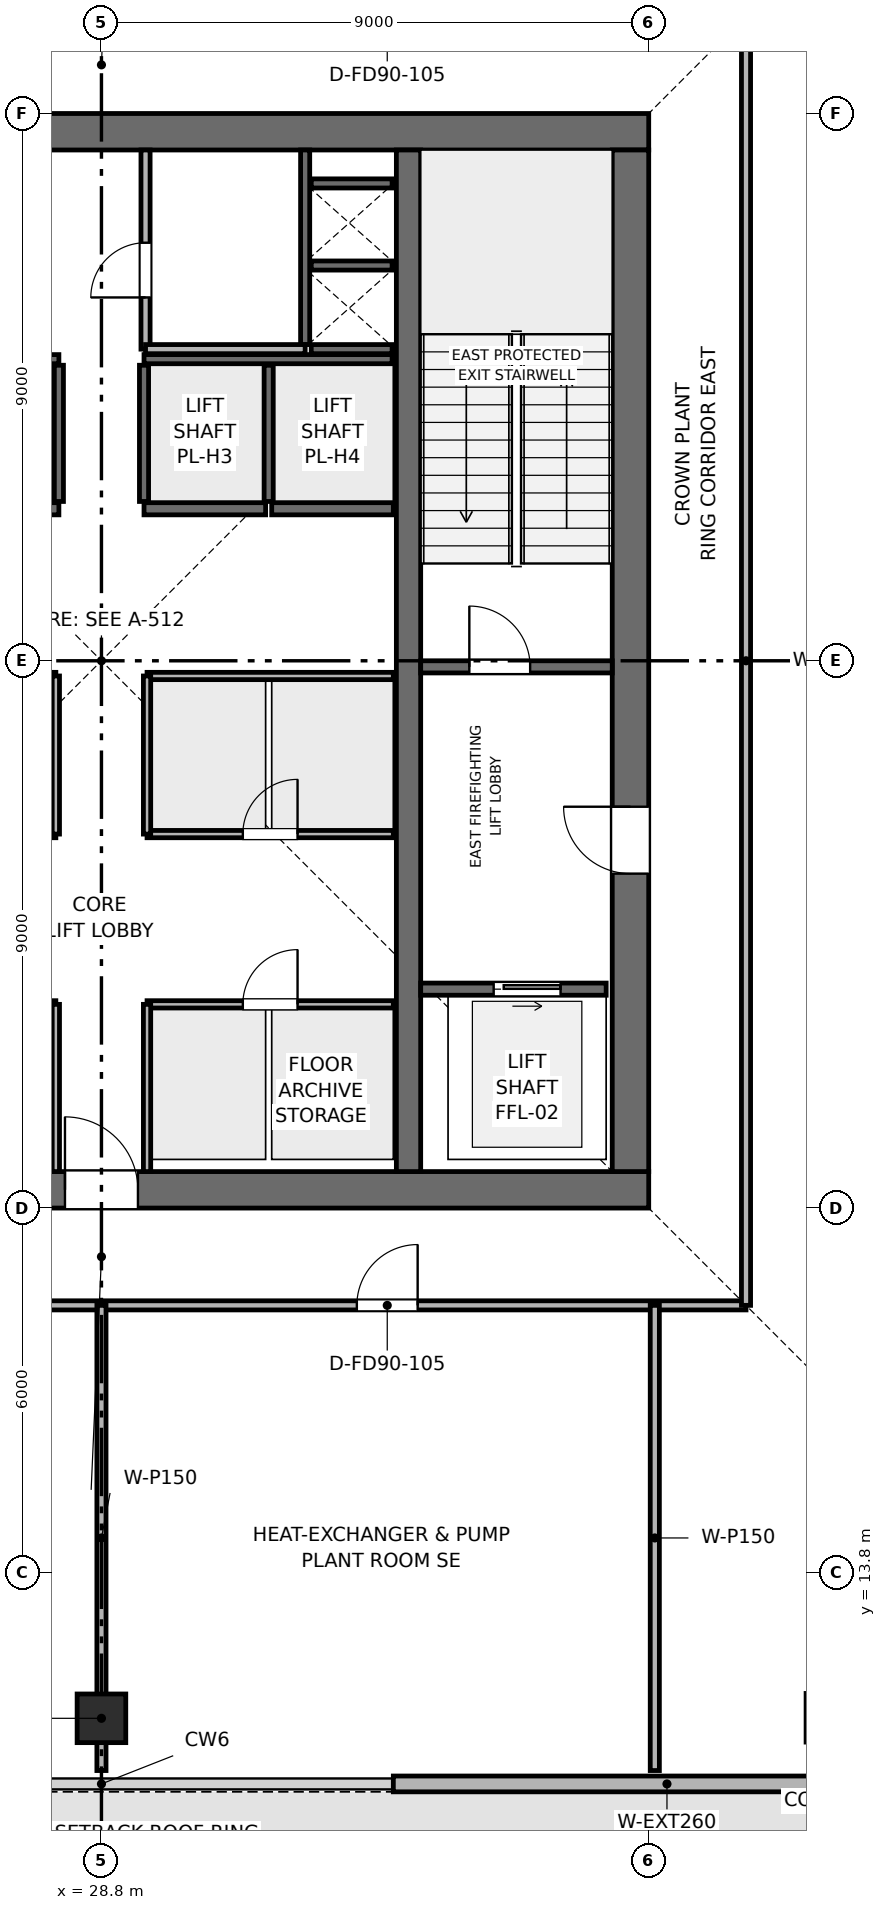
"""IFC4 building model, lengths in metres.
Left out: names, types, materials, properties, quantities, classifications, styles, units other than length and angle.
Written with IfcOpenShell. Run it as: python <this file> out.ifc"""

import sys

from ifc_helpers import new_model, si_unit, direction, frame, frame_2d, origin, origin_2d, place, context, subcontext, project, spatial, rectangle, extrude, element, fill, save


model = new_model("IFC4")
c1 = context("Model", 3, precision=1e-05, world=origin(), true_north=direction((0.0, 1.0)))
c2 = subcontext(c1, "Body", "Model", "MODEL_VIEW")
j1 = project(units=[si_unit("LENGTHUNIT", "METRE"), si_unit("PLANEANGLEUNIT", "RADIAN")], contexts=[c1])
p1 = place(None, origin())
s1 = spatial("IfcSite", under=j1, at=p1, CompositionType="ELEMENT")
p2 = place(p1, origin())
s2 = spatial("IfcBuilding", under=s1, at=p2, CompositionType="ELEMENT")
p3 = place(p2, frame((0.0, 0.0, 369.0)))
s3 = spatial("IfcBuildingStorey", under=s2, at=p3, CompositionType="ELEMENT", Elevation=369.0)
p4 = place(p3, frame((19.8, 20.1, 0.0), z_axis=(0.0, 0.0, 1.0), x_axis=(1.0, 0.0, 0.0)))
e1 = element("IfcWall", 1, at=p4, inside=s3, PredefinedType="SHEAR", context=c2, shape_type="SweptSolid", body=[
    extrude(rectangle(XDim=18.0, YDim=0.6, at=frame_2d((9.0, 0.0))), origin(), (0.0, 0.0, 1.0), 4.8),
])
p5 = place(p4, frame((8.4, 0.0, 0.0)))
e2 = element("IfcOpeningElement", 2, at=p5, cuts=e1, PredefinedType="OPENING", context=c2, shape_type="SweptSolid", body=[
    extrude(rectangle(XDim=1.2, YDim=2.2, at=frame_2d((0.6, 1.1))), frame((0.0, 0.31, 0.0), z_axis=(0.0, -1.0, 0.0), x_axis=(1.0, 0.0, 0.0)), (0.0, 0.0, 1.0), 0.62),
])
p6 = place(p3, frame((19.8, 37.5, 0.0), z_axis=(0.0, 0.0, 1.0), x_axis=(1.0, 0.0, 0.0)))
e3 = element("IfcWall", 3, at=p6, inside=s3, PredefinedType="SHEAR", context=c2, shape_type="SweptSolid", body=[
    extrude(rectangle(XDim=18.0, YDim=0.6, at=frame_2d((9.0, 0.0))), origin(), (0.0, 0.0, 1.0), 4.8),
])
p7 = place(p6, frame((7.05, 0.0, 0.0)))
e4 = element("IfcOpeningElement", 4, at=p7, cuts=e3, PredefinedType="OPENING", context=c2, shape_type="SweptSolid", body=[
    extrude(rectangle(XDim=1.1, YDim=2.15, at=frame_2d((0.55, 1.075))), frame((0.0, 0.31, 0.0), z_axis=(0.0, -1.0, 0.0), x_axis=(1.0, 0.0, 0.0)), (0.0, 0.0, 1.0), 0.62),
])
p8 = place(p3, frame((37.5, 20.4, 0.0), z_axis=(0.0, 0.0, 1.0), x_axis=(0.0, 1.0, 0.0)))
e5 = element("IfcWall", 5, at=p8, inside=s3, PredefinedType="SHEAR", context=c2, shape_type="SweptSolid", body=[
    extrude(rectangle(XDim=16.8, YDim=0.6, at=frame_2d((8.4, 0.0))), origin(), (0.0, 0.0, 1.0), 4.8),
])
p9 = place(p8, frame((4.9, 0.0, 0.0)))
e6 = element("IfcOpeningElement", 6, at=p9, cuts=e5, PredefinedType="OPENING", context=c2, shape_type="SweptSolid", body=[
    extrude(rectangle(XDim=1.1, YDim=2.15, at=frame_2d((0.55, 1.075))), frame((0.0, 0.31, 0.0), z_axis=(0.0, -1.0, 0.0), x_axis=(1.0, 0.0, 0.0)), (0.0, 0.0, 1.0), 0.62),
])
p10 = place(p3, frame((33.85, 20.4, 0.0), z_axis=(0.0, 0.0, 1.0), x_axis=(0.0, 1.0, 0.0)))
e7 = element("IfcWall", 7, at=p10, inside=s3, PredefinedType="SHEAR", context=c2, shape_type="SweptSolid", body=[
    extrude(rectangle(XDim=16.8, YDim=0.4, at=frame_2d((8.4, 0.0))), origin(), (0.0, 0.0, 1.0), 4.8),
])
p11 = place(p3, frame((28.8, 11.409, 0.025), z_axis=(0.0, 0.35111223817, 0.936333378774), x_axis=(-1.0, 0.0, 0.0)))
e8 = element("IfcColumn", 8, at=p11, inside=s3, PredefinedType="COLUMN", context=c2, shape_type="SweptSolid", body=[
    extrude(rectangle(XDim=0.8, YDim=0.8, at=origin_2d()), origin(), (0.0, 0.0, 1.0), 4.776),
])
p12 = place(p3, frame((40.788, 11.418, 0.049), z_axis=(-0.22799617066, 0.341969140747, 0.911633069245), x_axis=(-0.832031491738, -0.554728399089, 0.0)))
e9 = element("IfcColumn", 9, at=p12, inside=s3, PredefinedType="COLUMN", context=c2, shape_type="SweptSolid", body=[
    extrude(rectangle(XDim=0.8, YDim=0.8, at=origin_2d()), origin(), (0.0, 0.0, 1.0), 4.86),
])
p13 = place(p3, frame((41.246, 16.354, 0.018), z_axis=(-0.235770777249, 0.235770777249, 0.942774777553), x_axis=(-0.707106781187, -0.707106781187, 0.0)))
e10 = element("IfcColumn", 10, at=p13, inside=s3, PredefinedType="COLUMN", context=c2, shape_type="SweptSolid", body=[
    extrude(rectangle(XDim=0.8, YDim=0.8, at=origin_2d()), origin(), (0.0, 0.0, 1.0), 4.751),
])
p14 = place(p3, frame((42.6, 10.33, 0.0), z_axis=(0.0, 0.0, 1.0), x_axis=(-1.0, 0.0, 0.0)))
e11 = element("IfcWall", 11, at=p14, inside=s3, PredefinedType="SOLIDWALL", context=c2, shape_type="SweptSolid", body=[
    extrude(rectangle(XDim=9.0, YDim=0.26, at=frame_2d((4.5, 0.0))), origin(), (0.0, 0.0, 1.0), 4.5),
])
p15 = place(p3, frame((34.05, 28.7, 0.0), z_axis=(0.0, 0.0, 1.0), x_axis=(1.0, 0.0, 0.0)))
e12 = element("IfcWall", 12, at=p15, inside=s3, PredefinedType="SHEAR", context=c2, shape_type="SweptSolid", body=[
    extrude(rectangle(XDim=3.15, YDim=0.2, at=frame_2d((1.575, 0.0))), origin(), (0.0, 0.0, 1.0), 4.5),
])
p16 = place(p15, frame((0.8, 0.0, 0.0)))
e13 = element("IfcOpeningElement", 13, at=p16, cuts=e12, PredefinedType="OPENING", context=c2, shape_type="SweptSolid", body=[
    extrude(rectangle(XDim=1.0, YDim=2.1, at=frame_2d((0.5, 1.05))), frame((0.0, 0.11, 0.0), z_axis=(0.0, -1.0, 0.0), x_axis=(1.0, 0.0, 0.0)), (0.0, 0.0, 1.0), 0.22),
])
p17 = place(p3, frame((32.15, 34.0, 0.0), z_axis=(0.0, 0.0, 1.0), x_axis=(0.0, 1.0, 0.0)))
e14 = element("IfcWall", 14, at=p17, inside=s3, PredefinedType="SHEAR", context=c2, shape_type="SweptSolid", body=[
    extrude(rectangle(XDim=3.2, YDim=0.15, at=frame_2d((1.6, 0.0))), origin(), (0.0, 0.0, 1.0), 4.5),
])
for number, where, z_axis, x_axis in (
    (15, (32.25, 33.925, 0.0), (0.0, 0.0, 1.0), (1.0, 0.0, 0.0)),
    (16, (32.25, 35.3, 0.0), (0.0, 0.0, 1.0), (1.0, 0.0, 0.0)),
):
    element("IfcWall", number, at=place(p3, frame(where, z_axis=z_axis, x_axis=x_axis)), inside=s3, PredefinedType="SHEAR", context=c2, shape_type="SweptSolid", body=[
        extrude(rectangle(XDim=1.33, YDim=0.15, at=frame_2d((0.665, 0.0))), origin(), (0.0, 0.0, 1.0), 4.5),
    ])
p18 = place(p3, frame((34.05, 23.4, 0.0), z_axis=(0.0, 0.0, 1.0), x_axis=(1.0, 0.0, 0.0)))
e17 = element("IfcWall", 17, at=p18, inside=s3, PredefinedType="SHEAR", context=c2, shape_type="SweptSolid", body=[
    extrude(rectangle(XDim=3.05, YDim=0.2, at=frame_2d((1.525, 0.0))), origin(), (0.0, 0.0, 1.0), 4.5),
])
p19 = place(p18, frame((1.2, 0.0, 0.0)))
e18 = element("IfcOpeningElement", 18, at=p19, cuts=e17, PredefinedType="OPENING", context=c2, shape_type="SweptSolid", body=[
    extrude(rectangle(XDim=1.1, YDim=2.15, at=frame_2d((0.55, 1.075))), frame((0.0, 0.11, 0.0), z_axis=(0.0, -1.0, 0.0), x_axis=(1.0, 0.0, 0.0)), (0.0, 0.0, 1.0), 0.22),
])
for number, where, z_axis, x_axis in (
    (19, (26.1, 31.3, 0.0), (0.0, 0.0, 1.0), (1.0, 0.0, 0.0)),
    (20, (29.5, 31.3, 0.0), (0.0, 0.0, 1.0), (1.0, 0.0, 0.0)),
    (21, (31.6, 31.3, 0.0), (0.0, 0.0, 1.0), (1.0, 0.0, 0.0)),
):
    element("IfcWall", number, at=place(p3, frame(where, z_axis=z_axis, x_axis=x_axis)), inside=s3, PredefinedType="SHEAR", context=c2, shape_type="SweptSolid", body=[
        extrude(rectangle(XDim=2.0, YDim=0.2, at=frame_2d((1.0, 0.0))), origin(), (0.0, 0.0, 1.0), 4.5),
    ])
p20 = place(p3, frame((32.25, 36.65, 0.0), z_axis=(0.0, 0.0, 1.0), x_axis=(1.0, 0.0, 0.0)))
e22 = element("IfcWall", 22, at=p20, inside=s3, PredefinedType="SHEAR", context=c2, shape_type="SweptSolid", body=[
    extrude(rectangle(XDim=1.33, YDim=0.15, at=frame_2d((0.665, 0.0))), origin(), (0.0, 0.0, 1.0), 4.5),
])
for number, where, z_axis, x_axis in (
    (23, (24.02, 33.76, 0.0), (0.0, 0.0, 1.0), (1.0, 0.0, 0.0)),
    (24, (29.5, 33.76, 0.0), (0.0, 0.0, 1.0), (1.0, 0.0, 0.0)),
):
    element("IfcWall", number, at=place(p3, frame(where, z_axis=z_axis, x_axis=x_axis)), inside=s3, PredefinedType="SHEAR", context=c2, shape_type="SweptSolid", body=[
        extrude(rectangle(XDim=4.08, YDim=0.15, at=frame_2d((2.04, 0.0))), origin(), (0.0, 0.0, 1.0), 4.5),
    ])
for number, where, z_axis, x_axis in (
    (25, (28.1, 31.42, 0.0), (0.0, 0.0, 1.0), (0.0, 1.0, 0.0)),
    (26, (29.5, 31.42, 0.0), (0.0, 0.0, 1.0), (0.0, 1.0, 0.0)),
    (27, (31.55, 31.42, 0.0), (0.0, 0.0, 1.0), (0.0, 1.0, 0.0)),
):
    element("IfcWall", number, at=place(p3, frame(where, z_axis=z_axis, x_axis=x_axis)), inside=s3, PredefinedType="SHEAR", context=c2, shape_type="SweptSolid", body=[
        extrude(rectangle(XDim=2.24, YDim=0.15, at=frame_2d((1.12, 0.0))), origin(), (0.0, 0.0, 1.0), 4.5),
    ])
p21 = place(p3, frame((29.525, 33.925, 0.0), z_axis=(0.0, 0.0, 1.0), x_axis=(0.0, 1.0, 0.0)))
e28 = element("IfcWall", 28, at=p21, inside=s3, PredefinedType="PARTITIONING", context=c2, shape_type="SweptSolid", body=[
    extrude(rectangle(XDim=3.275, YDim=0.15, at=frame_2d((1.637, 0.0))), origin(), (0.0, 0.0, 1.0), 4.5),
])
p22 = place(p21, frame((0.85, 0.0, 0.0)))
e29 = element("IfcOpeningElement", 29, at=p22, cuts=e28, PredefinedType="OPENING", context=c2, shape_type="SweptSolid", body=[
    extrude(rectangle(XDim=0.9, YDim=2.1, at=frame_2d((0.45, 1.05))), frame((0.0, 0.085, 0.0), z_axis=(0.0, -1.0, 0.0), x_axis=(1.0, 0.0, 0.0)), (0.0, 0.0, 1.0), 0.17),
])
p23 = place(p3, frame((29.525, 33.925, 0.0), z_axis=(0.0, 0.0, 1.0), x_axis=(1.0, 0.0, 0.0)))
e30 = element("IfcWall", 30, at=p23, inside=s3, PredefinedType="PARTITIONING", context=c2, shape_type="SweptSolid", body=[
    extrude(rectangle(XDim=2.625, YDim=0.15, at=frame_2d((1.312, 0.0))), origin(), (0.0, 0.0, 1.0), 4.5),
])
p24 = place(p3, frame((24.0, 23.15, 0.0), z_axis=(0.0, 0.0, 1.0), x_axis=(1.0, 0.0, 0.0)))
e31 = element("IfcWall", 31, at=p24, inside=s3, PredefinedType="PARTITIONING", context=c2, shape_type="SweptSolid", body=[
    extrude(rectangle(XDim=4.05, YDim=0.12, at=frame_2d((2.025, 0.0))), origin(), (0.0, 0.0, 1.0), 4.5),
])
p25 = place(p24, frame((1.575, 0.0, 0.0)))
e32 = element("IfcOpeningElement", 32, at=p25, cuts=e31, PredefinedType="OPENING", context=c2, shape_type="SweptSolid", body=[
    extrude(rectangle(XDim=0.9, YDim=2.1, at=frame_2d((0.45, 1.05))), frame((0.0, 0.07, 0.0), z_axis=(0.0, -1.0, 0.0), x_axis=(1.0, 0.0, 0.0)), (0.0, 0.0, 1.0), 0.14),
])
p26 = place(p3, frame((28.05, 20.4, 0.0), z_axis=(0.0, 0.0, 1.0), x_axis=(0.0, 1.0, 0.0)))
e33 = element("IfcWall", 33, at=p26, inside=s3, PredefinedType="PARTITIONING", context=c2, shape_type="SweptSolid", body=[
    extrude(rectangle(XDim=2.75, YDim=0.12, at=frame_2d((1.375, 0.0))), origin(), (0.0, 0.0, 1.0), 4.5),
])
p27 = place(p3, frame((29.55, 23.15, 0.0), z_axis=(0.0, 0.0, 1.0), x_axis=(1.0, 0.0, 0.0)))
e34 = element("IfcWall", 34, at=p27, inside=s3, PredefinedType="PARTITIONING", context=c2, shape_type="SweptSolid", body=[
    extrude(rectangle(XDim=4.05, YDim=0.12, at=frame_2d((2.025, 0.0))), origin(), (0.0, 0.0, 1.0), 4.5),
])
p28 = place(p27, frame((1.575, 0.0, 0.0)))
e35 = element("IfcOpeningElement", 35, at=p28, cuts=e34, PredefinedType="OPENING", context=c2, shape_type="SweptSolid", body=[
    extrude(rectangle(XDim=0.9, YDim=2.1, at=frame_2d((0.45, 1.05))), frame((0.0, 0.07, 0.0), z_axis=(0.0, -1.0, 0.0), x_axis=(1.0, 0.0, 0.0)), (0.0, 0.0, 1.0), 0.14),
])
p29 = place(p3, frame((29.55, 20.4, 0.0), z_axis=(0.0, 0.0, 1.0), x_axis=(0.0, 1.0, 0.0)))
e36 = element("IfcWall", 36, at=p29, inside=s3, PredefinedType="PARTITIONING", context=c2, shape_type="SweptSolid", body=[
    extrude(rectangle(XDim=2.75, YDim=0.12, at=frame_2d((1.375, 0.0))), origin(), (0.0, 0.0, 1.0), 4.5),
])
p30 = place(p3, frame((24.0, 25.95, 0.0), z_axis=(0.0, 0.0, 1.0), x_axis=(1.0, 0.0, 0.0)))
e37 = element("IfcWall", 37, at=p30, inside=s3, PredefinedType="PARTITIONING", context=c2, shape_type="SweptSolid", body=[
    extrude(rectangle(XDim=4.05, YDim=0.12, at=frame_2d((2.025, 0.0))), origin(), (0.0, 0.0, 1.0), 4.5),
])
p31 = place(p30, frame((1.575, 0.0, 0.0)))
e38 = element("IfcOpeningElement", 38, at=p31, cuts=e37, PredefinedType="OPENING", context=c2, shape_type="SweptSolid", body=[
    extrude(rectangle(XDim=0.9, YDim=2.1, at=frame_2d((0.45, 1.05))), frame((0.0, 0.07, 0.0), z_axis=(0.0, -1.0, 0.0), x_axis=(1.0, 0.0, 0.0)), (0.0, 0.0, 1.0), 0.14),
])
p32 = place(p3, frame((24.0, 28.55, 0.0), z_axis=(0.0, 0.0, 1.0), x_axis=(1.0, 0.0, 0.0)))
e39 = element("IfcWall", 39, at=p32, inside=s3, PredefinedType="PARTITIONING", context=c2, shape_type="SweptSolid", body=[
    extrude(rectangle(XDim=4.05, YDim=0.12, at=frame_2d((2.025, 0.0))), origin(), (0.0, 0.0, 1.0), 4.5),
])
p33 = place(p3, frame((28.05, 25.95, 0.0), z_axis=(0.0, 0.0, 1.0), x_axis=(0.0, 1.0, 0.0)))
e40 = element("IfcWall", 40, at=p33, inside=s3, PredefinedType="PARTITIONING", context=c2, shape_type="SweptSolid", body=[
    extrude(rectangle(XDim=2.6, YDim=0.12, at=frame_2d((1.3, 0.0))), origin(), (0.0, 0.0, 1.0), 4.5),
])
p34 = place(p3, frame((29.55, 25.95, 0.0), z_axis=(0.0, 0.0, 1.0), x_axis=(1.0, 0.0, 0.0)))
e41 = element("IfcWall", 41, at=p34, inside=s3, PredefinedType="PARTITIONING", context=c2, shape_type="SweptSolid", body=[
    extrude(rectangle(XDim=4.05, YDim=0.12, at=frame_2d((2.025, 0.0))), origin(), (0.0, 0.0, 1.0), 4.5),
])
p35 = place(p34, frame((1.575, 0.0, 0.0)))
e42 = element("IfcOpeningElement", 42, at=p35, cuts=e41, PredefinedType="OPENING", context=c2, shape_type="SweptSolid", body=[
    extrude(rectangle(XDim=0.9, YDim=2.1, at=frame_2d((0.45, 1.05))), frame((0.0, 0.07, 0.0), z_axis=(0.0, -1.0, 0.0), x_axis=(1.0, 0.0, 0.0)), (0.0, 0.0, 1.0), 0.14),
])
p36 = place(p3, frame((29.55, 28.55, 0.0), z_axis=(0.0, 0.0, 1.0), x_axis=(1.0, 0.0, 0.0)))
e43 = element("IfcWall", 43, at=p36, inside=s3, PredefinedType="PARTITIONING", context=c2, shape_type="SweptSolid", body=[
    extrude(rectangle(XDim=4.05, YDim=0.12, at=frame_2d((2.025, 0.0))), origin(), (0.0, 0.0, 1.0), 4.5),
])
p37 = place(p3, frame((29.55, 25.95, 0.0), z_axis=(0.0, 0.0, 1.0), x_axis=(0.0, 1.0, 0.0)))
e44 = element("IfcWall", 44, at=p37, inside=s3, PredefinedType="PARTITIONING", context=c2, shape_type="SweptSolid", body=[
    extrude(rectangle(XDim=2.6, YDim=0.12, at=frame_2d((1.3, 0.0))), origin(), (0.0, 0.0, 1.0), 4.5),
])
p38 = place(p3, frame((18.2, 18.2, 0.0), z_axis=(0.0, 0.0, 1.0), x_axis=(1.0, 0.0, 0.0)))
e45 = element("IfcWall", 45, at=p38, inside=s3, PredefinedType="PARTITIONING", context=c2, shape_type="SweptSolid", body=[
    extrude(rectangle(XDim=21.2, YDim=0.15, at=frame_2d((10.6, 0.0))), origin(), (0.0, 0.0, 1.0), 4.085),
])
p39 = place(p38, frame((4.8, 0.0, 0.0)))
e46 = element("IfcOpeningElement", 46, at=p39, cuts=e45, PredefinedType="OPENING", context=c2, shape_type="SweptSolid", body=[
    extrude(rectangle(XDim=1.0, YDim=2.15, at=frame_2d((0.5, 1.075))), frame((0.0, 0.085, 0.0), z_axis=(0.0, -1.0, 0.0), x_axis=(1.0, 0.0, 0.0)), (0.0, 0.0, 1.0), 0.17),
])
p40 = place(p38, frame((14.8, 0.0, 0.0)))
e47 = element("IfcOpeningElement", 47, at=p40, cuts=e45, PredefinedType="OPENING", context=c2, shape_type="SweptSolid", body=[
    extrude(rectangle(XDim=1.0, YDim=2.15, at=frame_2d((0.5, 1.075))), frame((0.0, 0.085, 0.0), z_axis=(0.0, -1.0, 0.0), x_axis=(1.0, 0.0, 0.0)), (0.0, 0.0, 1.0), 0.17),
])
p41 = place(p3, frame((39.4, 18.2, 0.0), z_axis=(0.0, 0.0, 1.0), x_axis=(0.0, 1.0, 0.0)))
e48 = element("IfcWall", 48, at=p41, inside=s3, PredefinedType="PARTITIONING", context=c2, shape_type="SweptSolid", body=[
    extrude(rectangle(XDim=21.2, YDim=0.15, at=frame_2d((10.6, 0.0))), origin(), (0.0, 0.0, 1.0), 4.085),
])
p42 = place(p3, frame((28.8, 10.55, 0.0), z_axis=(0.0, 0.0, 1.0), x_axis=(0.0, 1.0, 0.0)))
e49 = element("IfcWall", 49, at=p42, inside=s3, PredefinedType="PARTITIONING", context=c2, shape_type="SweptSolid", body=[
    extrude(rectangle(XDim=7.65, YDim=0.15, at=frame_2d((3.825, 0.0))), origin(), (0.0, 0.0, 1.0), 4.085),
])
p43 = place(p3, frame((37.9, 10.55, 0.0), z_axis=(0.0, 0.0, 1.0), x_axis=(0.0, 1.0, 0.0)))
e50 = element("IfcWall", 50, at=p43, inside=s3, PredefinedType="PARTITIONING", context=c2, shape_type="SweptSolid", body=[
    extrude(rectangle(XDim=7.65, YDim=0.15, at=frame_2d((3.825, 0.0))), origin(), (0.0, 0.0, 1.0), 4.185),
])
p44 = place(p16, origin())
e51 = element("IfcDoor", 51, at=p44, inside=s3, OperationType="SINGLE_SWING_LEFT", PredefinedType="DOOR", context=c2, shape_type="SweptSolid", body=[
    extrude(rectangle(XDim=1.0, YDim=2.1, at=frame_2d((0.5, 1.05))), frame((0.0, 0.025, 0.0), z_axis=(0.0, -1.0, 0.0), x_axis=(1.0, 0.0, 0.0)), (0.0, 0.0, 1.0), 0.05),
])
fill(e13, e51)
p45 = place(p19, origin())
e52 = element("IfcDoor", 52, at=p45, inside=s3, OperationType="SLIDING_TO_RIGHT", PredefinedType="DOOR", context=c2, shape_type="SweptSolid", body=[
    extrude(rectangle(XDim=1.1, YDim=2.15, at=frame_2d((0.55, 1.075))), frame((0.0, 0.025, 0.0), z_axis=(0.0, -1.0, 0.0), x_axis=(1.0, 0.0, 0.0)), (0.0, 0.0, 1.0), 0.05),
])
fill(e18, e52)
p46 = place(p22, origin())
e53 = element("IfcDoor", 53, at=p46, inside=s3, OperationType="SINGLE_SWING_LEFT", PredefinedType="DOOR", context=c2, shape_type="SweptSolid", body=[
    extrude(rectangle(XDim=0.9, YDim=2.1, at=frame_2d((0.45, 1.05))), frame((0.0, 0.025, 0.0), z_axis=(0.0, -1.0, 0.0), x_axis=(1.0, 0.0, 0.0)), (0.0, 0.0, 1.0), 0.05),
])
fill(e29, e53)
p47 = place(p28, origin())
e54 = element("IfcDoor", 54, at=p47, inside=s3, OperationType="SINGLE_SWING_RIGHT", PredefinedType="DOOR", context=c2, shape_type="SweptSolid", body=[
    extrude(rectangle(XDim=0.9, YDim=2.1, at=frame_2d((0.45, 1.05))), frame((0.0, 0.025, 0.0), z_axis=(0.0, -1.0, 0.0), x_axis=(1.0, 0.0, 0.0)), (0.0, 0.0, 1.0), 0.05),
])
fill(e35, e54)
p48 = place(p35, origin())
e55 = element("IfcDoor", 55, at=p48, inside=s3, OperationType="SINGLE_SWING_RIGHT", PredefinedType="DOOR", context=c2, shape_type="SweptSolid", body=[
    extrude(rectangle(XDim=0.9, YDim=2.1, at=frame_2d((0.45, 1.05))), frame((0.0, 0.025, 0.0), z_axis=(0.0, -1.0, 0.0), x_axis=(1.0, 0.0, 0.0)), (0.0, 0.0, 1.0), 0.05),
])
fill(e42, e55)
p49 = place(p40, origin())
e56 = element("IfcDoor", 56, at=p49, inside=s3, OperationType="SINGLE_SWING_RIGHT", PredefinedType="DOOR", context=c2, shape_type="SweptSolid", body=[
    extrude(rectangle(XDim=1.0, YDim=2.15, at=frame_2d((0.5, 1.075))), frame((0.0, 0.025, 0.0), z_axis=(0.0, -1.0, 0.0), x_axis=(1.0, 0.0, 0.0)), (0.0, 0.0, 1.0), 0.05),
])
fill(e47, e56)
p50 = place(p9, origin())
e57 = element("IfcDoor", 57, at=p50, inside=s3, OperationType="SINGLE_SWING_RIGHT", PredefinedType="DOOR", context=c2, shape_type="SweptSolid", body=[
    extrude(rectangle(XDim=1.1, YDim=2.15, at=frame_2d((0.55, 1.075))), frame((0.0, 0.025, 0.0), z_axis=(0.0, -1.0, 0.0), x_axis=(1.0, 0.0, 0.0)), (0.0, 0.0, 1.0), 0.05),
])
fill(e6, e57)
p51 = place(p5, origin())
e58 = element("IfcDoor", 58, at=p51, inside=s3, OperationType="SINGLE_SWING_LEFT", PredefinedType="DOOR", context=c2, shape_type="SweptSolid", body=[
    extrude(rectangle(XDim=1.2, YDim=2.2, at=frame_2d((0.6, 1.1))), frame((0.0, 0.025, 0.0), z_axis=(0.0, -1.0, 0.0), x_axis=(1.0, 0.0, 0.0)), (0.0, 0.0, 1.0), 0.05),
])
fill(e2, e58)
save(model, sys.argv[1])
